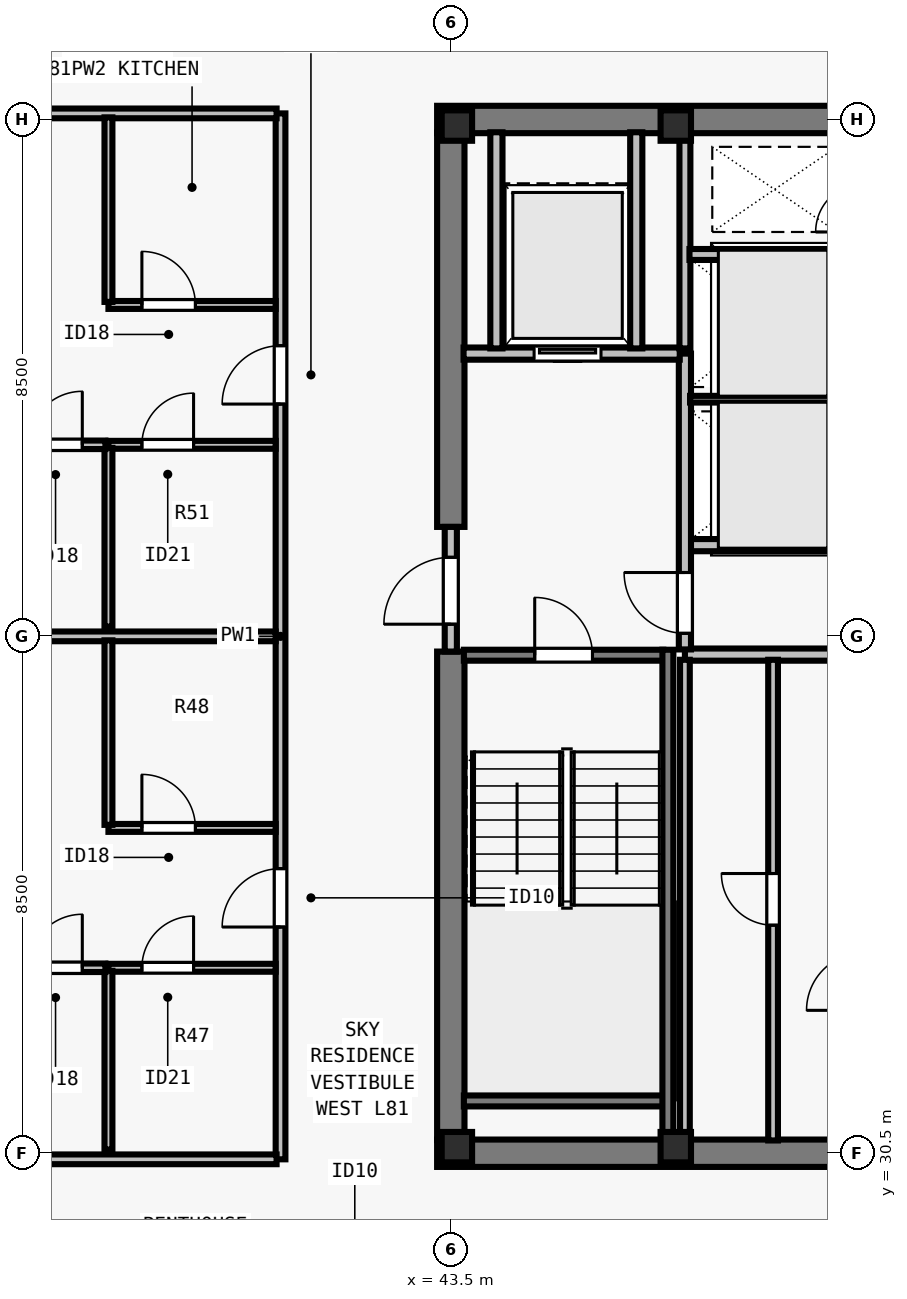
"""IFC4 building model, lengths in metres.
Left out: names, types, materials, properties, quantities, classifications, styles, units other than length and angle.
Written with IfcOpenShell. Run it as: python <this file> out.ifc"""

import sys

from ifc_helpers import new_model, si_unit, direction, frame, frame_2d, origin, origin_2d, place, context, subcontext, project, spatial, rectangle, i_section, extrude, element, fill, save


model = new_model("IFC4")
c1 = context("Model", 3, precision=1e-05, world=origin(), true_north=direction((0.0, 1.0)))
c2 = subcontext(c1, "Body", "Model", "MODEL_VIEW")
j1 = project(units=[si_unit("LENGTHUNIT", "METRE"), si_unit("PLANEANGLEUNIT", "RADIAN")], contexts=[c1])
p1 = place(None, origin())
s1 = spatial("IfcSite", under=j1, at=p1, CompositionType="ELEMENT")
p2 = place(p1, origin())
s2 = spatial("IfcBuilding", under=s1, at=p2, CompositionType="ELEMENT")
p3 = place(p2, frame((0.0, 0.0, 294.5)))
s3 = spatial("IfcBuildingStorey", under=s2, at=p3, CompositionType="ELEMENT", Elevation=294.5)
for number, where, z_axis, x_axis in (
    (1, (43.6, 30.6, 0.0), (0.0, 0.0, 1.0), (1.0, 0.0, 0.0)),
    (2, (47.2, 30.6, 0.0), (0.0, 0.0, 1.0), (1.0, 0.0, 0.0)),
    (3, (43.6, 47.4, 0.0), (0.0, 0.0, 1.0), (1.0, 0.0, 0.0)),
    (4, (47.2, 47.4, 0.0), (0.0, 0.0, 1.0), (1.0, 0.0, 0.0)),
):
    element("IfcColumn", number, at=place(p3, frame(where, z_axis=z_axis, x_axis=x_axis)), inside=s3, PredefinedType="COLUMN", context=c2, shape_type="SweptSolid", body=[
        extrude(i_section(OverallWidth=0.5, OverallDepth=0.5, WebThickness=0.028, FlangeThickness=0.045, at=origin_2d()), origin(), (0.0, 0.0, 1.0), 3.5),
    ])
for number, where, z_axis, x_axis in (
    (5, (43.275, 30.5, 0.0), (0.0, 0.0, 1.0), (1.0, 0.0, 0.0)),
    (6, (43.275, 47.5, 0.0), (0.0, 0.0, 1.0), (1.0, 0.0, 0.0)),
):
    element("IfcWall", number, at=place(p3, frame(where, z_axis=z_axis, x_axis=x_axis)), inside=s3, PredefinedType="SHEAR", context=c2, shape_type="SweptSolid", body=[
        extrude(rectangle(XDim=17.45, YDim=0.45, at=frame_2d((8.725, 0.0))), origin(), (0.0, 0.0, 1.0), 3.29),
    ])
p4 = place(p3, frame((43.5, 30.715, 0.0), z_axis=(0.0, 0.0, 1.0), x_axis=(0.0, 1.0, 0.0)))
e7 = element("IfcWall", 7, at=p4, inside=s3, PredefinedType="SHEAR", context=c2, shape_type="SweptSolid", body=[
    extrude(rectangle(XDim=8.035, YDim=0.45, at=frame_2d((4.018, 0.0))), origin(), (0.0, 0.0, 1.0), 3.29),
])
p5 = place(p3, frame((43.5, 40.8, 0.0), z_axis=(0.0, 0.0, 1.0), x_axis=(0.0, 1.0, 0.0)))
e8 = element("IfcWall", 8, at=p5, inside=s3, PredefinedType="SHEAR", context=c2, shape_type="SweptSolid", body=[
    extrude(rectangle(XDim=6.485, YDim=0.45, at=frame_2d((3.242, 0.0))), origin(), (0.0, 0.0, 1.0), 3.29),
])
for number, where, z_axis, x_axis in (
    (9, (47.35, 38.7, 0.0), (0.0, 0.0, 1.0), (1.0, 0.0, 0.0)),
    (10, (47.35, 40.5, 0.0), (0.0, 0.0, 1.0), (1.0, 0.0, 0.0)),
):
    element("IfcWall", number, at=place(p3, frame(where, z_axis=z_axis, x_axis=x_axis)), inside=s3, PredefinedType="SOLIDWALL", context=c2, shape_type="SweptSolid", body=[
        extrude(rectangle(XDim=2.95, YDim=0.2, at=frame_2d((1.475, 0.0))), origin(), (0.0, 0.0, 1.0), 3.29),
    ])
p6 = place(p3, frame((43.5, 38.75, 0.0), z_axis=(0.0, 0.0, 1.0), x_axis=(0.0, 1.0, 0.0)))
e11 = element("IfcWall", 11, at=p6, inside=s3, PredefinedType="SOLIDWALL", context=c2, shape_type="SweptSolid", body=[
    extrude(rectangle(XDim=2.05, YDim=0.2, at=frame_2d((1.025, 0.0))), origin(), (0.0, 0.0, 1.0), 3.29),
])
p7 = place(p6, frame((0.45, 0.0, 0.0)))
e12 = element("IfcOpeningElement", 12, at=p7, cuts=e11, PredefinedType="OPENING", context=c2, shape_type="SweptSolid", body=[
    extrude(rectangle(XDim=1.1, YDim=2.15, at=frame_2d((0.55, 1.075))), frame((0.0, 0.11, 0.0), z_axis=(0.0, -1.0, 0.0), x_axis=(1.0, 0.0, 0.0)), (0.0, 0.0, 1.0), 0.22),
])
p8 = place(p3, frame((47.35, 38.785, 0.0), z_axis=(0.0, 0.0, 1.0), x_axis=(0.0, 1.0, 0.0)))
e13 = element("IfcWall", 13, at=p8, inside=s3, PredefinedType="SOLIDWALL", context=c2, shape_type="SweptSolid", body=[
    extrude(rectangle(XDim=4.865, YDim=0.2, at=frame_2d((2.433, 0.0))), origin(), (0.0, 0.0, 1.0), 3.29),
])
p9 = place(p8, frame((0.265, 0.0, 0.0)))
e14 = element("IfcOpeningElement", 14, at=p9, cuts=e13, PredefinedType="OPENING", context=c2, shape_type="SweptSolid", body=[
    extrude(rectangle(XDim=1.0, YDim=2.15, at=frame_2d((0.5, 1.075))), frame((0.0, 0.11, 0.0), z_axis=(0.0, -1.0, 0.0), x_axis=(1.0, 0.0, 0.0)), (0.0, 0.0, 1.0), 0.22),
])
p10 = place(p3, frame((43.71, 43.65, 0.0), z_axis=(0.0, 0.0, 1.0), x_axis=(1.0, 0.0, 0.0)))
e15 = element("IfcWall", 15, at=p10, inside=s3, PredefinedType="SOLIDWALL", context=c2, shape_type="SweptSolid", body=[
    extrude(rectangle(XDim=3.555, YDim=0.2, at=frame_2d((1.777, 0.0))), origin(), (0.0, 0.0, 1.0), 3.29),
])
p11 = place(p10, frame((1.16, 0.0, 0.0)))
e16 = element("IfcOpeningElement", 16, at=p11, cuts=e15, PredefinedType="OPENING", context=c2, shape_type="SweptSolid", body=[
    extrude(rectangle(XDim=1.1, YDim=2.2, at=frame_2d((0.55, 1.1))), frame((0.0, 0.11, 0.0), z_axis=(0.0, -1.0, 0.0), x_axis=(1.0, 0.0, 0.0)), (0.0, 0.0, 1.0), 0.22),
])
for number, where, z_axis, x_axis in (
    (17, (46.55, 43.735, 0.0), (0.0, 0.0, 1.0), (0.0, 1.0, 0.0)),
    (18, (44.25, 43.735, 0.0), (0.0, 0.0, 1.0), (0.0, 1.0, 0.0)),
):
    element("IfcWall", number, at=place(p3, frame(where, z_axis=z_axis, x_axis=x_axis)), inside=s3, PredefinedType="SOLIDWALL", context=c2, shape_type="SweptSolid", body=[
        extrude(rectangle(XDim=3.555, YDim=0.2, at=frame_2d((1.777, 0.0))), origin(), (0.0, 0.0, 1.0), 3.29),
    ])
p12 = place(p3, frame((47.35, 30.71, 0.0), z_axis=(0.0, 0.0, 1.0), x_axis=(0.0, 1.0, 0.0)))
e19 = element("IfcWall", 19, at=p12, inside=s3, PredefinedType="PARTITIONING", context=c2, shape_type="SweptSolid", body=[
    extrude(rectangle(XDim=7.905, YDim=0.16, at=frame_2d((3.953, 0.0))), origin(), (0.0, 0.0, 1.0), 3.29),
])
p13 = place(p3, frame((48.8, 30.71, 0.0), z_axis=(0.0, 0.0, 1.0), x_axis=(0.0, 1.0, 0.0)))
e20 = element("IfcWall", 20, at=p13, inside=s3, PredefinedType="PARTITIONING", context=c2, shape_type="SweptSolid", body=[
    extrude(rectangle(XDim=7.905, YDim=0.16, at=frame_2d((3.953, 0.0))), origin(), (0.0, 0.0, 1.0), 3.29),
])
p14 = place(p13, frame((3.54, 0.0, 0.0)))
e21 = element("IfcOpeningElement", 21, at=p14, cuts=e20, PredefinedType="OPENING", context=c2, shape_type="SweptSolid", body=[
    extrude(rectangle(XDim=0.85, YDim=2.12, at=frame_2d((0.425, 1.06))), frame((0.0, 0.09, 0.0), z_axis=(0.0, -1.0, 0.0), x_axis=(1.0, 0.0, 0.0)), (0.0, 0.0, 1.0), 0.18),
])
p15 = place(p3, frame((47.35, 43.735, 0.0), z_axis=(0.0, 0.0, 1.0), x_axis=(0.0, 1.0, 0.0)))
e22 = element("IfcWall", 22, at=p15, inside=s3, PredefinedType="SOLIDWALL", context=c2, shape_type="SweptSolid", body=[
    extrude(rectangle(XDim=3.555, YDim=0.18, at=frame_2d((1.777, 0.0))), origin(), (0.0, 0.0, 1.0), 3.29),
])
p16 = place(p3, frame((47.435, 42.9, 0.0), z_axis=(0.0, 0.0, 1.0), x_axis=(1.0, 0.0, 0.0)))
e23 = element("IfcWall", 23, at=p16, inside=s3, PredefinedType="PARTITIONING", context=c2, shape_type="SweptSolid", body=[
    extrude(rectangle(XDim=2.78, YDim=0.11, at=frame_2d((1.39, 0.0))), origin(), (0.0, 0.0, 1.0), 3.29),
])
p17 = place(p3, frame((47.425, 45.28, 0.0), z_axis=(0.0, 0.0, 1.0), x_axis=(1.0, 0.0, 0.0)))
e24 = element("IfcWall", 24, at=p17, inside=s3, PredefinedType="SOLIDWALL", context=c2, shape_type="SweptSolid", body=[
    extrude(rectangle(XDim=2.79, YDim=0.18, at=frame_2d((1.395, 0.0))), origin(), (0.0, 0.0, 1.0), 3.29),
])
p18 = place(p3, frame((40.7, 30.4, 0.0), z_axis=(0.0, 0.0, 1.0), x_axis=(0.0, 1.0, 0.0)))
e25 = element("IfcWall", 25, at=p18, inside=s3, PredefinedType="PARTITIONING", context=c2, shape_type="SweptSolid", body=[
    extrude(rectangle(XDim=17.2, YDim=0.16, at=frame_2d((8.6, 0.0))), origin(), (0.0, 0.0, 1.0), 3.009),
])
p19 = place(p18, frame((3.82, 0.0, 0.0)))
e26 = element("IfcOpeningElement", 26, at=p19, cuts=e25, PredefinedType="OPENING", context=c2, shape_type="SweptSolid", body=[
    extrude(rectangle(XDim=0.96, YDim=2.18, at=frame_2d((0.48, 1.09))), frame((0.0, 0.09, 0.0), z_axis=(0.0, -1.0, 0.0), x_axis=(1.0, 0.0, 0.0)), (0.0, 0.0, 1.0), 0.18),
])
p20 = place(p18, frame((12.42, 0.0, 0.0)))
e27 = element("IfcOpeningElement", 27, at=p20, cuts=e25, PredefinedType="OPENING", context=c2, shape_type="SweptSolid", body=[
    extrude(rectangle(XDim=0.96, YDim=2.18, at=frame_2d((0.48, 1.09))), frame((0.0, 0.09, 0.0), z_axis=(0.0, -1.0, 0.0), x_axis=(1.0, 0.0, 0.0)), (0.0, 0.0, 1.0), 0.18),
])
for number, where, z_axis, x_axis in (
    (28, (31.285, 30.4, 0.0), (0.0, 0.0, 1.0), (1.0, 0.0, 0.0)),
    (29, (31.285, 47.6, 0.0), (0.0, 0.0, 1.0), (1.0, 0.0, 0.0)),
):
    element("IfcWall", number, at=place(p3, frame(where, z_axis=z_axis, x_axis=x_axis)), inside=s3, PredefinedType="PARTITIONING", context=c2, shape_type="SweptSolid", body=[
        extrude(rectangle(XDim=9.35, YDim=0.16, at=frame_2d((4.675, 0.0))), origin(), (0.0, 0.0, 1.0), 3.29),
    ])
p21 = place(p3, frame((31.285, 39.0, 0.0), z_axis=(0.0, 0.0, 1.0), x_axis=(1.0, 0.0, 0.0)))
e30 = element("IfcWall", 30, at=p21, inside=s3, PredefinedType="PARTITIONING", context=c2, shape_type="SweptSolid", body=[
    extrude(rectangle(XDim=9.335, YDim=0.16, at=frame_2d((4.667, 0.0))), origin(), (0.0, 0.0, 1.0), 3.29),
])
p22 = place(p3, frame((37.87, 33.55, 0.0), z_axis=(0.0, 0.0, 1.0), x_axis=(1.0, 0.0, 0.0)))
e31 = element("IfcWall", 31, at=p22, inside=s3, PredefinedType="PLUMBINGWALL", context=c2, shape_type="SweptSolid", body=[
    extrude(rectangle(XDim=2.75, YDim=0.13, at=frame_2d((1.375, 0.0))), origin(), (0.0, 0.0, 1.0), 3.29),
])
p23 = place(p22, frame((0.55, 0.0, 0.0)))
e32 = element("IfcOpeningElement", 32, at=p23, cuts=e31, PredefinedType="OPENING", context=c2, shape_type="SweptSolid", body=[
    extrude(rectangle(XDim=0.85, YDim=2.08, at=frame_2d((0.425, 1.04))), frame((0.0, 0.075, 0.0), z_axis=(0.0, -1.0, 0.0), x_axis=(1.0, 0.0, 0.0)), (0.0, 0.0, 1.0), 0.15),
])
p24 = place(p3, frame((37.87, 30.56, 0.0), z_axis=(0.0, 0.0, 1.0), x_axis=(0.0, 1.0, 0.0)))
e33 = element("IfcWall", 33, at=p24, inside=s3, PredefinedType="PLUMBINGWALL", context=c2, shape_type="SweptSolid", body=[
    extrude(rectangle(XDim=2.94, YDim=0.13, at=frame_2d((1.47, 0.0))), origin(), (0.0, 0.0, 1.0), 3.29),
])
p25 = place(p3, frame((37.87, 35.85, 0.0), z_axis=(0.0, 0.0, 1.0), x_axis=(1.0, 0.0, 0.0)))
e34 = element("IfcWall", 34, at=p25, inside=s3, PredefinedType="PLUMBINGWALL", context=c2, shape_type="SweptSolid", body=[
    extrude(rectangle(XDim=2.75, YDim=0.13, at=frame_2d((1.375, 0.0))), origin(), (0.0, 0.0, 1.0), 3.29),
])
p26 = place(p25, frame((0.55, 0.0, 0.0)))
e35 = element("IfcOpeningElement", 35, at=p26, cuts=e34, PredefinedType="OPENING", context=c2, shape_type="SweptSolid", body=[
    extrude(rectangle(XDim=0.88, YDim=2.1, at=frame_2d((0.44, 1.05))), frame((0.0, 0.075, 0.0), z_axis=(0.0, -1.0, 0.0), x_axis=(1.0, 0.0, 0.0)), (0.0, 0.0, 1.0), 0.15),
])
p27 = place(p3, frame((37.87, 35.9, 0.0), z_axis=(0.0, 0.0, 1.0), x_axis=(0.0, 1.0, 0.0)))
e36 = element("IfcWall", 36, at=p27, inside=s3, PredefinedType="PLUMBINGWALL", context=c2, shape_type="SweptSolid", body=[
    extrude(rectangle(XDim=3.035, YDim=0.13, at=frame_2d((1.518, 0.0))), origin(), (0.0, 0.0, 1.0), 3.29),
])
p28 = place(p3, frame((31.38, 33.55, 0.0), z_axis=(0.0, 0.0, 1.0), x_axis=(1.0, 0.0, 0.0)))
e37 = element("IfcWall", 37, at=p28, inside=s3, PredefinedType="PARTITIONING", context=c2, shape_type="SweptSolid", body=[
    extrude(rectangle(XDim=6.44, YDim=0.14, at=frame_2d((3.22, 0.0))), origin(), (0.0, 0.0, 1.0), 2.653),
])
p29 = place(p28, frame((5.18, 0.0, 0.0)))
e38 = element("IfcOpeningElement", 38, at=p29, cuts=e37, PredefinedType="OPENING", context=c2, shape_type="SweptSolid", body=[
    extrude(rectangle(XDim=0.88, YDim=2.1, at=frame_2d((0.44, 1.05))), frame((0.0, 0.08, 0.0), z_axis=(0.0, -1.0, 0.0), x_axis=(1.0, 0.0, 0.0)), (0.0, 0.0, 1.0), 0.16),
])
p30 = place(p3, frame((37.87, 42.15, 0.0), z_axis=(0.0, 0.0, 1.0), x_axis=(1.0, 0.0, 0.0)))
e39 = element("IfcWall", 39, at=p30, inside=s3, PredefinedType="PLUMBINGWALL", context=c2, shape_type="SweptSolid", body=[
    extrude(rectangle(XDim=2.75, YDim=0.13, at=frame_2d((1.375, 0.0))), origin(), (0.0, 0.0, 1.0), 3.29),
])
p31 = place(p30, frame((0.55, 0.0, 0.0)))
e40 = element("IfcOpeningElement", 40, at=p31, cuts=e39, PredefinedType="OPENING", context=c2, shape_type="SweptSolid", body=[
    extrude(rectangle(XDim=0.85, YDim=2.08, at=frame_2d((0.425, 1.04))), frame((0.0, 0.075, 0.0), z_axis=(0.0, -1.0, 0.0), x_axis=(1.0, 0.0, 0.0)), (0.0, 0.0, 1.0), 0.15),
])
p32 = place(p3, frame((37.87, 39.16, 0.0), z_axis=(0.0, 0.0, 1.0), x_axis=(0.0, 1.0, 0.0)))
e41 = element("IfcWall", 41, at=p32, inside=s3, PredefinedType="PLUMBINGWALL", context=c2, shape_type="SweptSolid", body=[
    extrude(rectangle(XDim=2.94, YDim=0.13, at=frame_2d((1.47, 0.0))), origin(), (0.0, 0.0, 1.0), 3.009),
])
p33 = place(p3, frame((37.87, 44.45, 0.0), z_axis=(0.0, 0.0, 1.0), x_axis=(1.0, 0.0, 0.0)))
e42 = element("IfcWall", 42, at=p33, inside=s3, PredefinedType="PLUMBINGWALL", context=c2, shape_type="SweptSolid", body=[
    extrude(rectangle(XDim=2.75, YDim=0.13, at=frame_2d((1.375, 0.0))), origin(), (0.0, 0.0, 1.0), 3.29),
])
p34 = place(p33, frame((0.55, 0.0, 0.0)))
e43 = element("IfcOpeningElement", 43, at=p34, cuts=e42, PredefinedType="OPENING", context=c2, shape_type="SweptSolid", body=[
    extrude(rectangle(XDim=0.88, YDim=2.1, at=frame_2d((0.44, 1.05))), frame((0.0, 0.075, 0.0), z_axis=(0.0, -1.0, 0.0), x_axis=(1.0, 0.0, 0.0)), (0.0, 0.0, 1.0), 0.15),
])
p35 = place(p3, frame((37.87, 44.5, 0.0), z_axis=(0.0, 0.0, 1.0), x_axis=(0.0, 1.0, 0.0)))
e44 = element("IfcWall", 44, at=p35, inside=s3, PredefinedType="PLUMBINGWALL", context=c2, shape_type="SweptSolid", body=[
    extrude(rectangle(XDim=3.035, YDim=0.13, at=frame_2d((1.518, 0.0))), origin(), (0.0, 0.0, 1.0), 3.29),
])
p36 = place(p3, frame((31.38, 42.15, 0.0), z_axis=(0.0, 0.0, 1.0), x_axis=(1.0, 0.0, 0.0)))
e45 = element("IfcWall", 45, at=p36, inside=s3, PredefinedType="PARTITIONING", context=c2, shape_type="SweptSolid", body=[
    extrude(rectangle(XDim=6.44, YDim=0.14, at=frame_2d((3.22, 0.0))), origin(), (0.0, 0.0, 1.0), 3.29),
])
p37 = place(p36, frame((5.18, 0.0, 0.0)))
e46 = element("IfcOpeningElement", 46, at=p37, cuts=e45, PredefinedType="OPENING", context=c2, shape_type="SweptSolid", body=[
    extrude(rectangle(XDim=0.88, YDim=2.1, at=frame_2d((0.44, 1.05))), frame((0.0, 0.08, 0.0), z_axis=(0.0, -1.0, 0.0), x_axis=(1.0, 0.0, 0.0)), (0.0, 0.0, 1.0), 0.16),
])
p38 = place(p3, frame((43.715, 38.69, 0.0), z_axis=(0.0, 0.0, 1.0), x_axis=(1.0, 0.0, 0.0)))
e47 = element("IfcWall", 47, at=p38, inside=s3, PredefinedType="SOLIDWALL", context=c2, shape_type="SweptSolid", body=[
    extrude(rectangle(XDim=3.28, YDim=0.18, at=frame_2d((1.64, 0.0))), origin(), (0.0, 0.0, 1.0), 3.29),
])
p39 = place(p38, frame((1.165, 0.0, 0.0)))
e48 = element("IfcOpeningElement", 48, at=p39, cuts=e47, PredefinedType="OPENING", context=c2, shape_type="SweptSolid", body=[
    extrude(rectangle(XDim=0.95, YDim=2.15, at=frame_2d((0.475, 1.075))), frame((0.0, 0.1, 0.0), z_axis=(0.0, -1.0, 0.0), x_axis=(1.0, 0.0, 0.0)), (0.0, 0.0, 1.0), 0.2),
])
p40 = place(p3, frame((43.715, 31.36, 0.0), z_axis=(0.0, 0.0, 1.0), x_axis=(1.0, 0.0, 0.0)))
e49 = element("IfcWall", 49, at=p40, inside=s3, PredefinedType="SOLIDWALL", context=c2, shape_type="SweptSolid", body=[
    extrude(rectangle(XDim=3.28, YDim=0.18, at=frame_2d((1.64, 0.0))), origin(), (0.0, 0.0, 1.0), 3.29),
])
p41 = place(p3, frame((47.07, 38.78, 0.0), z_axis=(0.0, 0.0, 1.0), x_axis=(0.0, -1.0, 0.0)))
e50 = element("IfcWall", 50, at=p41, inside=s3, PredefinedType="SOLIDWALL", context=c2, shape_type="SweptSolid", body=[
    extrude(rectangle(XDim=8.067, YDim=0.18, at=frame_2d((4.034, 0.0))), origin(), (0.0, 0.0, 1.0), 3.29),
])
p42 = place(p7, origin())
e51 = element("IfcDoor", 51, at=p42, inside=s3, OperationType="SINGLE_SWING_LEFT", PredefinedType="DOOR", context=c2, shape_type="SweptSolid", body=[
    extrude(rectangle(XDim=1.1, YDim=2.15, at=frame_2d((0.55, 1.075))), frame((0.0, 0.025, 0.0), z_axis=(0.0, -1.0, 0.0), x_axis=(1.0, 0.0, 0.0)), (0.0, 0.0, 1.0), 0.05),
])
fill(e12, e51)
p43 = place(p9, origin())
e52 = element("IfcDoor", 52, at=p43, inside=s3, OperationType="SINGLE_SWING_RIGHT", PredefinedType="DOOR", context=c2, shape_type="SweptSolid", body=[
    extrude(rectangle(XDim=1.0, YDim=2.15, at=frame_2d((0.5, 1.075))), frame((0.0, 0.025, 0.0), z_axis=(0.0, -1.0, 0.0), x_axis=(1.0, 0.0, 0.0)), (0.0, 0.0, 1.0), 0.05),
])
fill(e14, e52)
p44 = place(p11, origin())
e53 = element("IfcDoor", 53, at=p44, inside=s3, OperationType="SLIDING_TO_LEFT", PredefinedType="DOOR", context=c2, shape_type="SweptSolid", body=[
    extrude(rectangle(XDim=1.1, YDim=2.2, at=frame_2d((0.55, 1.1))), frame((0.0, 0.025, 0.0), z_axis=(0.0, -1.0, 0.0), x_axis=(1.0, 0.0, 0.0)), (0.0, 0.0, 1.0), 0.05),
])
fill(e16, e53)
p45 = place(p14, origin())
e54 = element("IfcDoor", 54, at=p45, inside=s3, OperationType="SINGLE_SWING_RIGHT", PredefinedType="DOOR", context=c2, shape_type="SweptSolid", body=[
    extrude(rectangle(XDim=0.85, YDim=2.12, at=frame_2d((0.425, 1.06))), frame((0.0, 0.025, 0.0), z_axis=(0.0, -1.0, 0.0), x_axis=(1.0, 0.0, 0.0)), (0.0, 0.0, 1.0), 0.05),
])
fill(e21, e54)
p46 = place(p23, origin())
e55 = element("IfcDoor", 55, at=p46, inside=s3, OperationType="SINGLE_SWING_RIGHT", PredefinedType="DOOR", context=c2, shape_type="SweptSolid", body=[
    extrude(rectangle(XDim=0.85, YDim=2.08, at=frame_2d((0.425, 1.04))), frame((0.0, 0.025, 0.0), z_axis=(0.0, -1.0, 0.0), x_axis=(1.0, 0.0, 0.0)), (0.0, 0.0, 1.0), 0.05),
])
fill(e32, e55)
p47 = place(p26, origin())
e56 = element("IfcDoor", 56, at=p47, inside=s3, OperationType="SINGLE_SWING_LEFT", PredefinedType="DOOR", context=c2, shape_type="SweptSolid", body=[
    extrude(rectangle(XDim=0.88, YDim=2.1, at=frame_2d((0.44, 1.05))), frame((0.0, 0.025, 0.0), z_axis=(0.0, -1.0, 0.0), x_axis=(1.0, 0.0, 0.0)), (0.0, 0.0, 1.0), 0.05),
])
fill(e35, e56)
p48 = place(p29, origin())
e57 = element("IfcDoor", 57, at=p48, inside=s3, OperationType="SINGLE_SWING_RIGHT", PredefinedType="DOOR", context=c2, shape_type="SweptSolid", body=[
    extrude(rectangle(XDim=0.88, YDim=2.1, at=frame_2d((0.44, 1.05))), frame((0.0, 0.025, 0.0), z_axis=(0.0, -1.0, 0.0), x_axis=(1.0, 0.0, 0.0)), (0.0, 0.0, 1.0), 0.05),
])
fill(e38, e57)
p49 = place(p19, origin())
e58 = element("IfcDoor", 58, at=p49, inside=s3, OperationType="SINGLE_SWING_LEFT", PredefinedType="DOOR", context=c2, shape_type="SweptSolid", body=[
    extrude(rectangle(XDim=0.96, YDim=2.18, at=frame_2d((0.48, 1.09))), frame((0.0, 0.025, 0.0), z_axis=(0.0, -1.0, 0.0), x_axis=(1.0, 0.0, 0.0)), (0.0, 0.0, 1.0), 0.05),
])
fill(e26, e58)
p50 = place(p31, origin())
e59 = element("IfcDoor", 59, at=p50, inside=s3, OperationType="SINGLE_SWING_RIGHT", PredefinedType="DOOR", context=c2, shape_type="SweptSolid", body=[
    extrude(rectangle(XDim=0.85, YDim=2.08, at=frame_2d((0.425, 1.04))), frame((0.0, 0.025, 0.0), z_axis=(0.0, -1.0, 0.0), x_axis=(1.0, 0.0, 0.0)), (0.0, 0.0, 1.0), 0.05),
])
fill(e40, e59)
p51 = place(p34, origin())
e60 = element("IfcDoor", 60, at=p51, inside=s3, OperationType="SINGLE_SWING_LEFT", PredefinedType="DOOR", context=c2, shape_type="SweptSolid", body=[
    extrude(rectangle(XDim=0.88, YDim=2.1, at=frame_2d((0.44, 1.05))), frame((0.0, 0.025, 0.0), z_axis=(0.0, -1.0, 0.0), x_axis=(1.0, 0.0, 0.0)), (0.0, 0.0, 1.0), 0.05),
])
fill(e43, e60)
p52 = place(p37, origin())
e61 = element("IfcDoor", 61, at=p52, inside=s3, OperationType="SINGLE_SWING_RIGHT", PredefinedType="DOOR", context=c2, shape_type="SweptSolid", body=[
    extrude(rectangle(XDim=0.88, YDim=2.1, at=frame_2d((0.44, 1.05))), frame((0.0, 0.025, 0.0), z_axis=(0.0, -1.0, 0.0), x_axis=(1.0, 0.0, 0.0)), (0.0, 0.0, 1.0), 0.05),
])
fill(e46, e61)
p53 = place(p20, origin())
e62 = element("IfcDoor", 62, at=p53, inside=s3, OperationType="SINGLE_SWING_LEFT", PredefinedType="DOOR", context=c2, shape_type="SweptSolid", body=[
    extrude(rectangle(XDim=0.96, YDim=2.18, at=frame_2d((0.48, 1.09))), frame((0.0, 0.025, 0.0), z_axis=(0.0, -1.0, 0.0), x_axis=(1.0, 0.0, 0.0)), (0.0, 0.0, 1.0), 0.05),
])
fill(e27, e62)
p54 = place(p39, origin())
e63 = element("IfcDoor", 63, at=p54, inside=s3, OperationType="SINGLE_SWING_LEFT", PredefinedType="DOOR", context=c2, shape_type="SweptSolid", body=[
    extrude(rectangle(XDim=0.95, YDim=2.15, at=frame_2d((0.475, 1.075))), frame((0.0, 0.025, 0.0), z_axis=(0.0, -1.0, 0.0), x_axis=(1.0, 0.0, 0.0)), (0.0, 0.0, 1.0), 0.05),
])
fill(e48, e63)
save(model, sys.argv[1])
